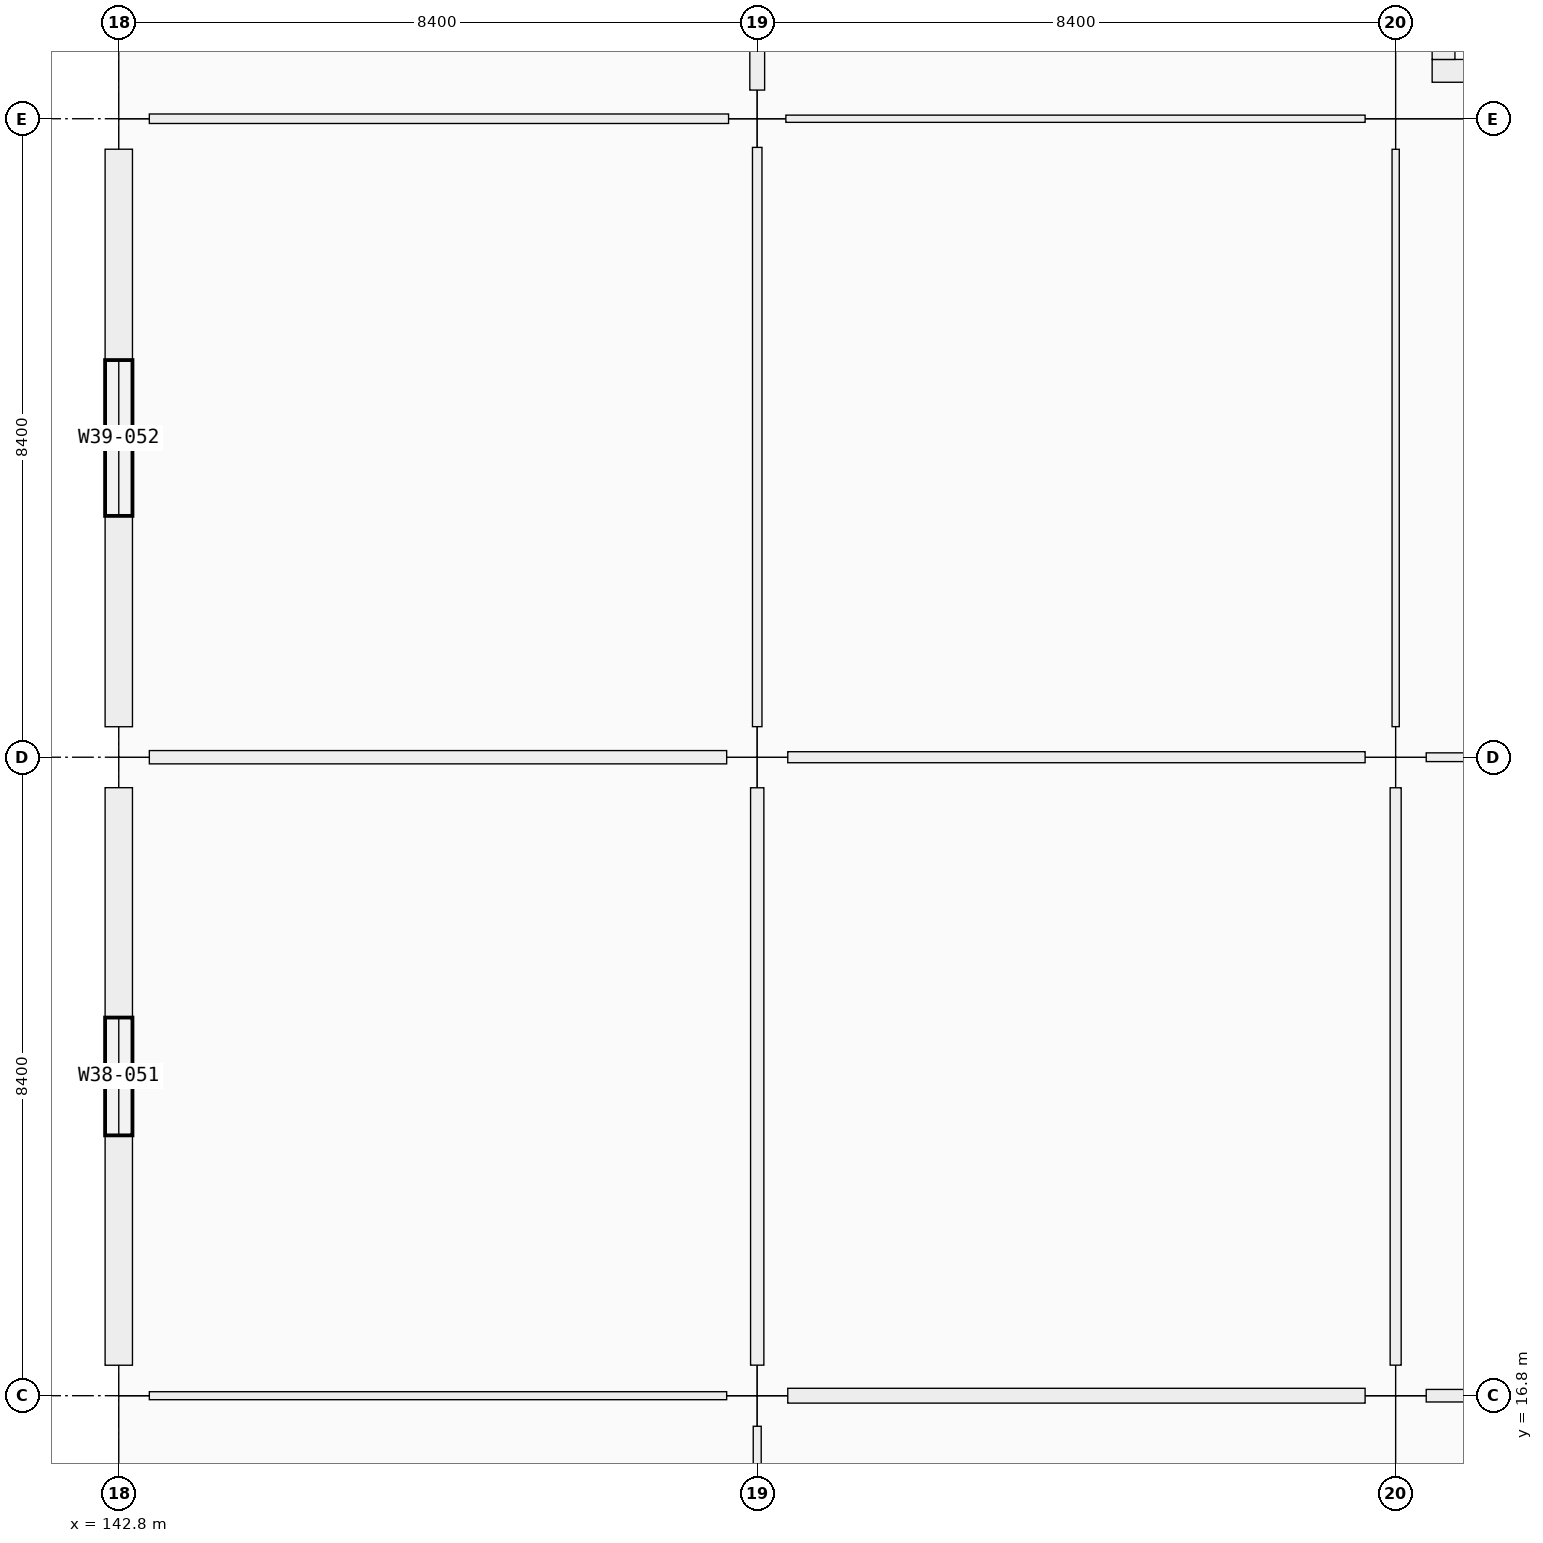
"""IFC4 building model, lengths in metres.
Left out: names, types, materials, properties, quantities, classifications, styles, units other than length and angle.
Written with IfcOpenShell. Run it as: python <this file> out.ifc"""

import sys

from ifc_helpers import new_model, si_unit, direction, frame, frame_2d, origin, origin_2d, place, context, subcontext, project, spatial, rectangle, extrude, element, fill, save


model = new_model("IFC4")
c1 = context("Model", 3, precision=1e-05, world=origin(), true_north=direction((0.0, 1.0)))
c2 = subcontext(c1, "Body", "Model", "MODEL_VIEW")
j1 = project(units=[si_unit("LENGTHUNIT", "METRE"), si_unit("PLANEANGLEUNIT", "RADIAN")], contexts=[c1])
p1 = place(None, origin())
s1 = spatial("IfcSite", under=j1, at=p1, CompositionType="ELEMENT")
p2 = place(p1, origin())
s2 = spatial("IfcBuilding", under=s1, at=p2, CompositionType="ELEMENT")
p3 = place(p2, origin())
s3 = spatial("IfcBuildingStorey", under=s2, at=p3, CompositionType="ELEMENT", Elevation=0.0)
for number, where, z_axis, x_axis in (
    (1, (142.8, 16.8, 0.0), (0.0, 0.0, 1.0), (1.0, 0.0, 0.0)),
    (2, (142.8, 25.2, 0.0), (0.0, 0.0, 1.0), (1.0, 0.0, 0.0)),
    (3, (142.8, 33.6, 0.0), (0.0, 0.0, 1.0), (1.0, 0.0, 0.0)),
    (4, (151.2, 16.8, 0.0), (0.0, 0.0, 1.0), (1.0, 0.0, 0.0)),
    (5, (151.2, 25.2, 0.0), (0.0, 0.0, 1.0), (1.0, 0.0, 0.0)),
):
    element("IfcColumn", number, at=place(p3, frame(where, z_axis=z_axis, x_axis=x_axis)), inside=s3, PredefinedType="COLUMN", context=c2, shape_type="SweptSolid", body=[
        extrude(rectangle(XDim=0.8, YDim=0.8, at=origin_2d()), origin(), (0.0, 0.0, 1.0), 5.76),
    ])
p4 = place(p3, frame((151.2, 33.6, 0.0), z_axis=(0.0, 0.0, 1.0), x_axis=(1.0, 0.0, 0.0)))
e6 = element("IfcColumn", 6, at=p4, inside=s3, PredefinedType="COLUMN", context=c2, shape_type="SweptSolid", body=[
    extrude(rectangle(XDim=0.75, YDim=0.75, at=origin_2d()), origin(), (0.0, 0.0, 1.0), 5.51),
])
for number, where, z_axis, x_axis in (
    (7, (159.6, 16.8, 0.0), (0.0, 0.0, 1.0), (1.0, 0.0, 0.0)),
    (8, (159.6, 25.2, 0.0), (0.0, 0.0, 1.0), (1.0, 0.0, 0.0)),
    (9, (159.6, 33.6, 0.0), (0.0, 0.0, 1.0), (1.0, 0.0, 0.0)),
):
    element("IfcColumn", number, at=place(p3, frame(where, z_axis=z_axis, x_axis=x_axis)), inside=s3, PredefinedType="COLUMN", context=c2, shape_type="SweptSolid", body=[
        extrude(rectangle(XDim=0.8, YDim=0.8, at=origin_2d()), origin(), (0.0, 0.0, 1.0), 5.76),
    ])
p5 = place(p3, frame((142.8, 17.201, 0.0), z_axis=(0.0, 0.0, 1.0), x_axis=(0.0, 1.0, 0.0)))
e10 = element("IfcWall", 10, at=p5, inside=s3, PredefinedType="SOLIDWALL", context=c2, shape_type="SweptSolid", body=[
    extrude(rectangle(XDim=7.598, YDim=0.36, at=frame_2d((3.799, 0.0))), origin(), (0.0, 0.0, 1.0), 4.7),
])
p6 = place(p5, frame((3.024, 0.0, 0.9)))
e11 = element("IfcOpeningElement", 11, at=p6, cuts=e10, PredefinedType="OPENING", context=c2, shape_type="SweptSolid", body=[
    extrude(rectangle(XDim=1.55, YDim=1.6, at=frame_2d((0.775, 0.8))), frame((0.0, 0.18, 0.0), z_axis=(0.0, -1.0, 0.0), x_axis=(1.0, 0.0, 0.0)), (0.0, 0.0, 1.0), 0.36),
])
p7 = place(p3, frame((142.8, 25.601, 0.0), z_axis=(0.0, 0.0, 1.0), x_axis=(0.0, 1.0, 0.0)))
e12 = element("IfcWall", 12, at=p7, inside=s3, PredefinedType="SOLIDWALL", context=c2, shape_type="SweptSolid", body=[
    extrude(rectangle(XDim=7.598, YDim=0.36, at=frame_2d((3.799, 0.0))), origin(), (0.0, 0.0, 1.0), 4.7),
])
p8 = place(p7, frame((2.774, 0.0, 0.9)))
e13 = element("IfcOpeningElement", 13, at=p8, cuts=e12, PredefinedType="OPENING", context=c2, shape_type="SweptSolid", body=[
    extrude(rectangle(XDim=2.05, YDim=1.45, at=frame_2d((1.025, 0.725))), frame((0.0, 0.18, 0.0), z_axis=(0.0, -1.0, 0.0), x_axis=(1.0, 0.0, 0.0)), (0.0, 0.0, 1.0), 0.36),
])
p9 = place(p3, frame((167.52, 34.23, 0.0), z_axis=(0.0, 0.0, 1.0), x_axis=(-1.0, 0.0, 0.0)))
e14 = element("IfcWall", 14, at=p9, inside=s3, PredefinedType="SHEAR", context=c2, shape_type="SweptSolid", body=[
    extrude(rectangle(XDim=7.44, YDim=0.3, at=frame_2d((3.72, 0.0))), origin(), (0.0, 0.0, 1.0), 5.76),
])
p10 = place(p9, frame((1.28, 0.0, 0.0)))
e15 = element("IfcOpeningElement", 15, at=p10, cuts=e14, PredefinedType="OPENING", context=c2, shape_type="SweptSolid", body=[
    extrude(rectangle(XDim=1.5, YDim=2.15, at=frame_2d((0.75, 1.075))), frame((0.0, 0.15, 0.0), z_axis=(0.0, -1.0, 0.0), x_axis=(1.0, 0.0, 0.0)), (0.0, 0.0, 1.0), 0.3),
])
p11 = place(p3, frame((160.23, 34.38, 0.0), z_axis=(0.0, 0.0, 1.0), x_axis=(0.0, 1.0, 0.0)))
e16 = element("IfcWall", 16, at=p11, inside=s3, PredefinedType="SHEAR", context=c2, shape_type="SweptSolid", body=[
    extrude(rectangle(XDim=6.84, YDim=0.3, at=frame_2d((3.42, 0.0))), origin(), (0.0, 0.0, 1.0), 5.76),
])
p12 = place(p3, frame((143.202, 16.8, 0.0), z_axis=(0.0, 0.0, 1.0), x_axis=(1.0, 0.0, 0.0)))
e17 = element("IfcWall", 17, at=p12, inside=s3, PredefinedType="PARTITIONING", context=c2, shape_type="SweptSolid", body=[
    extrude(rectangle(XDim=7.596, YDim=0.105, at=frame_2d((3.798, 0.0))), origin(), (0.0, 0.0, 1.0), 3.66),
])
p13 = place(p12, frame((3.313, 0.0, 0.0)))
e18 = element("IfcOpeningElement", 18, at=p13, cuts=e17, PredefinedType="OPENING", context=c2, shape_type="SweptSolid", body=[
    extrude(rectangle(XDim=0.97, YDim=2.12, at=frame_2d((0.485, 1.06))), frame((0.0, 0.052, 0.0), z_axis=(0.0, -1.0, 0.0), x_axis=(1.0, 0.0, 0.0)), (0.0, 0.0, 1.0), 0.105),
])
p14 = place(p3, frame((143.202, 25.2, 0.0), z_axis=(0.0, 0.0, 1.0), x_axis=(1.0, 0.0, 0.0)))
e19 = element("IfcWall", 19, at=p14, inside=s3, PredefinedType="PARTITIONING", context=c2, shape_type="SweptSolid", body=[
    extrude(rectangle(XDim=7.596, YDim=0.175, at=frame_2d((3.798, 0.0))), origin(), (0.0, 0.0, 1.0), 3.66),
])
p15 = place(p14, frame((3.333, 0.0, 0.0)))
e20 = element("IfcOpeningElement", 20, at=p15, cuts=e19, PredefinedType="OPENING", context=c2, shape_type="SweptSolid", body=[
    extrude(rectangle(XDim=0.93, YDim=2.12, at=frame_2d((0.465, 1.06))), frame((0.0, 0.087, 0.0), z_axis=(0.0, -1.0, 0.0), x_axis=(1.0, 0.0, 0.0)), (0.0, 0.0, 1.0), 0.175),
])
p16 = place(p3, frame((143.202, 33.6, 0.0), z_axis=(0.0, 0.0, 1.0), x_axis=(1.0, 0.0, 0.0)))
e21 = element("IfcWall", 21, at=p16, inside=s3, PredefinedType="PARTITIONING", context=c2, shape_type="SweptSolid", body=[
    extrude(rectangle(XDim=7.621, YDim=0.125, at=frame_2d((3.811, 0.0))), origin(), (0.0, 0.0, 1.0), 3.66),
])
p17 = place(p16, frame((3.271, 0.0, 0.0)))
e22 = element("IfcOpeningElement", 22, at=p17, cuts=e21, PredefinedType="OPENING", context=c2, shape_type="SweptSolid", body=[
    extrude(rectangle(XDim=1.08, YDim=2.25, at=frame_2d((0.54, 1.125))), frame((0.0, 0.062, 0.0), z_axis=(0.0, -1.0, 0.0), x_axis=(1.0, 0.0, 0.0)), (0.0, 0.0, 1.0), 0.125),
])
p18 = place(p3, frame((151.602, 16.8, 0.0), z_axis=(0.0, 0.0, 1.0), x_axis=(1.0, 0.0, 0.0)))
e23 = element("IfcWall", 23, at=p18, inside=s3, PredefinedType="PARTITIONING", context=c2, shape_type="SweptSolid", body=[
    extrude(rectangle(XDim=7.596, YDim=0.195, at=frame_2d((3.798, 0.0))), origin(), (0.0, 0.0, 1.0), 3.66),
])
p19 = place(p18, frame((3.288, 0.0, 0.0)))
e24 = element("IfcOpeningElement", 24, at=p19, cuts=e23, PredefinedType="OPENING", context=c2, shape_type="SweptSolid", body=[
    extrude(rectangle(XDim=1.02, YDim=2.2, at=frame_2d((0.51, 1.1))), frame((0.0, 0.098, 0.0), z_axis=(0.0, -1.0, 0.0), x_axis=(1.0, 0.0, 0.0)), (0.0, 0.0, 1.0), 0.195),
])
p20 = place(p3, frame((151.602, 25.2, 0.0), z_axis=(0.0, 0.0, 1.0), x_axis=(1.0, 0.0, 0.0)))
e25 = element("IfcWall", 25, at=p20, inside=s3, PredefinedType="PARTITIONING", context=c2, shape_type="SweptSolid", body=[
    extrude(rectangle(XDim=7.596, YDim=0.145, at=frame_2d((3.798, 0.0))), origin(), (0.0, 0.0, 1.0), 3.66),
])
p21 = place(p20, frame((3.278, 0.0, 0.0)))
e26 = element("IfcOpeningElement", 26, at=p21, cuts=e25, PredefinedType="OPENING", context=c2, shape_type="SweptSolid", body=[
    extrude(rectangle(XDim=1.04, YDim=2.2, at=frame_2d((0.52, 1.1))), frame((0.0, 0.073, 0.0), z_axis=(0.0, -1.0, 0.0), x_axis=(1.0, 0.0, 0.0)), (0.0, 0.0, 1.0), 0.145),
])
p22 = place(p3, frame((151.577, 33.6, 0.0), z_axis=(0.0, 0.0, 1.0), x_axis=(1.0, 0.0, 0.0)))
e27 = element("IfcWall", 27, at=p22, inside=s3, PredefinedType="PARTITIONING", context=c2, shape_type="SweptSolid", body=[
    extrude(rectangle(XDim=7.621, YDim=0.095, at=frame_2d((3.811, 0.0))), origin(), (0.0, 0.0, 1.0), 3.66),
])
p23 = place(p22, frame((3.311, 0.0, 0.0)))
e28 = element("IfcOpeningElement", 28, at=p23, cuts=e27, PredefinedType="OPENING", context=c2, shape_type="SweptSolid", body=[
    extrude(rectangle(XDim=1.0, YDim=2.2, at=frame_2d((0.5, 1.1))), frame((0.0, 0.047, 0.0), z_axis=(0.0, -1.0, 0.0), x_axis=(1.0, 0.0, 0.0)), (0.0, 0.0, 1.0), 0.095),
])
p24 = place(p3, frame((160.002, 16.8, 0.0), z_axis=(0.0, 0.0, 1.0), x_axis=(1.0, 0.0, 0.0)))
e29 = element("IfcWall", 29, at=p24, inside=s3, PredefinedType="PARTITIONING", context=c2, shape_type="SweptSolid", body=[
    extrude(rectangle(XDim=7.596, YDim=0.165, at=frame_2d((3.798, 0.0))), origin(), (0.0, 0.0, 1.0), 3.66),
])
p25 = place(p24, frame((3.338, 0.0, 0.0)))
e30 = element("IfcOpeningElement", 30, at=p25, cuts=e29, PredefinedType="OPENING", context=c2, shape_type="SweptSolid", body=[
    extrude(rectangle(XDim=0.92, YDim=2.15, at=frame_2d((0.46, 1.075))), frame((0.0, 0.083, 0.0), z_axis=(0.0, -1.0, 0.0), x_axis=(1.0, 0.0, 0.0)), (0.0, 0.0, 1.0), 0.165),
])
p26 = place(p3, frame((160.002, 25.2, 0.0), z_axis=(0.0, 0.0, 1.0), x_axis=(1.0, 0.0, 0.0)))
e31 = element("IfcWall", 31, at=p26, inside=s3, PredefinedType="PARTITIONING", context=c2, shape_type="SweptSolid", body=[
    extrude(rectangle(XDim=7.596, YDim=0.115, at=frame_2d((3.798, 0.0))), origin(), (0.0, 0.0, 1.0), 3.66),
])
p27 = place(p26, frame((3.268, 0.0, 0.0)))
e32 = element("IfcOpeningElement", 32, at=p27, cuts=e31, PredefinedType="OPENING", context=c2, shape_type="SweptSolid", body=[
    extrude(rectangle(XDim=1.06, YDim=2.25, at=frame_2d((0.53, 1.125))), frame((0.0, 0.058, 0.0), z_axis=(0.0, -1.0, 0.0), x_axis=(1.0, 0.0, 0.0)), (0.0, 0.0, 1.0), 0.115),
])
p28 = place(p3, frame((151.2, 8.752, 0.0), z_axis=(0.0, 0.0, 1.0), x_axis=(0.0, 1.0, 0.0)))
e33 = element("IfcWall", 33, at=p28, inside=s3, PredefinedType="PARTITIONING", context=c2, shape_type="SweptSolid", body=[
    extrude(rectangle(XDim=7.646, YDim=0.105, at=frame_2d((3.823, 0.0))), origin(), (0.0, 0.0, 1.0), 3.66),
])
p29 = place(p28, frame((3.358, 0.0, 0.0)))
e34 = element("IfcOpeningElement", 34, at=p29, cuts=e33, PredefinedType="OPENING", context=c2, shape_type="SweptSolid", body=[
    extrude(rectangle(XDim=0.93, YDim=2.12, at=frame_2d((0.465, 1.06))), frame((0.0, 0.052, 0.0), z_axis=(0.0, -1.0, 0.0), x_axis=(1.0, 0.0, 0.0)), (0.0, 0.0, 1.0), 0.105),
])
p30 = place(p3, frame((151.2, 17.202, 0.0), z_axis=(0.0, 0.0, 1.0), x_axis=(0.0, 1.0, 0.0)))
e35 = element("IfcWall", 35, at=p30, inside=s3, PredefinedType="PARTITIONING", context=c2, shape_type="SweptSolid", body=[
    extrude(rectangle(XDim=7.596, YDim=0.175, at=frame_2d((3.798, 0.0))), origin(), (0.0, 0.0, 1.0), 3.66),
])
p31 = place(p30, frame((3.278, 0.0, 0.0)))
e36 = element("IfcOpeningElement", 36, at=p31, cuts=e35, PredefinedType="OPENING", context=c2, shape_type="SweptSolid", body=[
    extrude(rectangle(XDim=1.04, YDim=2.2, at=frame_2d((0.52, 1.1))), frame((0.0, 0.087, 0.0), z_axis=(0.0, -1.0, 0.0), x_axis=(1.0, 0.0, 0.0)), (0.0, 0.0, 1.0), 0.175),
])
p32 = place(p3, frame((151.2, 25.602, 0.0), z_axis=(0.0, 0.0, 1.0), x_axis=(0.0, 1.0, 0.0)))
e37 = element("IfcWall", 37, at=p32, inside=s3, PredefinedType="PARTITIONING", context=c2, shape_type="SweptSolid", body=[
    extrude(rectangle(XDim=7.621, YDim=0.125, at=frame_2d((3.811, 0.0))), origin(), (0.0, 0.0, 1.0), 3.66),
])
p33 = place(p32, frame((3.301, 0.0, 0.0)))
e38 = element("IfcOpeningElement", 38, at=p33, cuts=e37, PredefinedType="OPENING", context=c2, shape_type="SweptSolid", body=[
    extrude(rectangle(XDim=1.02, YDim=2.2, at=frame_2d((0.51, 1.1))), frame((0.0, 0.062, 0.0), z_axis=(0.0, -1.0, 0.0), x_axis=(1.0, 0.0, 0.0)), (0.0, 0.0, 1.0), 0.125),
])
p34 = place(p3, frame((151.2, 33.977, 0.0), z_axis=(0.0, 0.0, 1.0), x_axis=(0.0, 1.0, 0.0)))
e39 = element("IfcWall", 39, at=p34, inside=s3, PredefinedType="PARTITIONING", context=c2, shape_type="SweptSolid", body=[
    extrude(rectangle(XDim=7.671, YDim=0.195, at=frame_2d((3.835, 0.0))), origin(), (0.0, 0.0, 1.0), 3.66),
])
p35 = place(p34, frame((3.336, 0.0, 0.0)))
e40 = element("IfcOpeningElement", 40, at=p35, cuts=e39, PredefinedType="OPENING", context=c2, shape_type="SweptSolid", body=[
    extrude(rectangle(XDim=1.0, YDim=2.2, at=frame_2d((0.5, 1.1))), frame((0.0, 0.098, 0.0), z_axis=(0.0, -1.0, 0.0), x_axis=(1.0, 0.0, 0.0)), (0.0, 0.0, 1.0), 0.195),
])
p36 = place(p3, frame((159.6, 17.202, 0.0), z_axis=(0.0, 0.0, 1.0), x_axis=(0.0, 1.0, 0.0)))
e41 = element("IfcWall", 41, at=p36, inside=s3, PredefinedType="PARTITIONING", context=c2, shape_type="SweptSolid", body=[
    extrude(rectangle(XDim=7.596, YDim=0.145, at=frame_2d((3.798, 0.0))), origin(), (0.0, 0.0, 1.0), 3.66),
])
p37 = place(p36, frame((3.273, 0.0, 0.0)))
e42 = element("IfcOpeningElement", 42, at=p37, cuts=e41, PredefinedType="OPENING", context=c2, shape_type="SweptSolid", body=[
    extrude(rectangle(XDim=1.05, YDim=2.12, at=frame_2d((0.525, 1.06))), frame((0.0, 0.073, 0.0), z_axis=(0.0, -1.0, 0.0), x_axis=(1.0, 0.0, 0.0)), (0.0, 0.0, 1.0), 0.145),
])
p38 = place(p3, frame((159.6, 25.602, 0.0), z_axis=(0.0, 0.0, 1.0), x_axis=(0.0, 1.0, 0.0)))
e43 = element("IfcWall", 43, at=p38, inside=s3, PredefinedType="PARTITIONING", context=c2, shape_type="SweptSolid", body=[
    extrude(rectangle(XDim=7.596, YDim=0.095, at=frame_2d((3.798, 0.0))), origin(), (0.0, 0.0, 1.0), 3.66),
])
p39 = place(p38, frame((3.328, 0.0, 0.0)))
e44 = element("IfcOpeningElement", 44, at=p39, cuts=e43, PredefinedType="OPENING", context=c2, shape_type="SweptSolid", body=[
    extrude(rectangle(XDim=0.94, YDim=2.15, at=frame_2d((0.47, 1.075))), frame((0.0, 0.047, 0.0), z_axis=(0.0, -1.0, 0.0), x_axis=(1.0, 0.0, 0.0)), (0.0, 0.0, 1.0), 0.095),
])
p40 = place(p6, origin())
e45 = element("IfcWindow", 45, at=p40, inside=s3, PartitioningType="SINGLE_PANEL", PredefinedType="WINDOW", context=c2, shape_type="SweptSolid", body=[
    extrude(rectangle(XDim=1.55, YDim=1.6, at=frame_2d((0.775, 0.8))), frame((0.0, 0.03, 0.0), z_axis=(0.0, -1.0, 0.0), x_axis=(1.0, 0.0, 0.0)), (0.0, 0.0, 1.0), 0.06),
])
fill(e11, e45)
p41 = place(p8, origin())
e46 = element("IfcWindow", 46, at=p41, inside=s3, PartitioningType="SINGLE_PANEL", PredefinedType="WINDOW", context=c2, shape_type="SweptSolid", body=[
    extrude(rectangle(XDim=2.05, YDim=1.45, at=frame_2d((1.025, 0.725))), frame((0.0, 0.03, 0.0), z_axis=(0.0, -1.0, 0.0), x_axis=(1.0, 0.0, 0.0)), (0.0, 0.0, 1.0), 0.06),
])
fill(e13, e46)
p42 = place(p39, origin())
e47 = element("IfcDoor", 47, at=p42, inside=s3, OperationType="SINGLE_SWING_RIGHT", PredefinedType="DOOR", context=c2, shape_type="SweptSolid", body=[
    extrude(rectangle(XDim=0.94, YDim=2.15, at=frame_2d((0.47, 1.075))), frame((0.0, 0.025, 0.0), z_axis=(0.0, -1.0, 0.0), x_axis=(1.0, 0.0, 0.0)), (0.0, 0.0, 1.0), 0.05),
])
fill(e44, e47)
p43 = place(p13, origin())
e48 = element("IfcDoor", 48, at=p43, inside=s3, OperationType="SINGLE_SWING_LEFT", PredefinedType="DOOR", context=c2, shape_type="SweptSolid", body=[
    extrude(rectangle(XDim=0.97, YDim=2.12, at=frame_2d((0.485, 1.06))), frame((0.0, 0.025, 0.0), z_axis=(0.0, -1.0, 0.0), x_axis=(1.0, 0.0, 0.0)), (0.0, 0.0, 1.0), 0.05),
])
fill(e18, e48)
p44 = place(p15, origin())
e49 = element("IfcDoor", 49, at=p44, inside=s3, OperationType="SINGLE_SWING_RIGHT", PredefinedType="DOOR", context=c2, shape_type="SweptSolid", body=[
    extrude(rectangle(XDim=0.93, YDim=2.12, at=frame_2d((0.465, 1.06))), frame((0.0, 0.025, 0.0), z_axis=(0.0, -1.0, 0.0), x_axis=(1.0, 0.0, 0.0)), (0.0, 0.0, 1.0), 0.05),
])
fill(e20, e49)
p45 = place(p17, origin())
e50 = element("IfcDoor", 50, at=p45, inside=s3, OperationType="SINGLE_SWING_LEFT", PredefinedType="DOOR", context=c2, shape_type="SweptSolid", body=[
    extrude(rectangle(XDim=1.08, YDim=2.25, at=frame_2d((0.54, 1.125))), frame((0.0, 0.025, 0.0), z_axis=(0.0, -1.0, 0.0), x_axis=(1.0, 0.0, 0.0)), (0.0, 0.0, 1.0), 0.05),
])
fill(e22, e50)
p46 = place(p19, origin())
e51 = element("IfcDoor", 51, at=p46, inside=s3, OperationType="SINGLE_SWING_RIGHT", PredefinedType="DOOR", context=c2, shape_type="SweptSolid", body=[
    extrude(rectangle(XDim=1.02, YDim=2.2, at=frame_2d((0.51, 1.1))), frame((0.0, 0.025, 0.0), z_axis=(0.0, -1.0, 0.0), x_axis=(1.0, 0.0, 0.0)), (0.0, 0.0, 1.0), 0.05),
])
fill(e24, e51)
p47 = place(p23, origin())
e52 = element("IfcDoor", 52, at=p47, inside=s3, OperationType="SINGLE_SWING_LEFT", PredefinedType="DOOR", context=c2, shape_type="SweptSolid", body=[
    extrude(rectangle(XDim=1.0, YDim=2.2, at=frame_2d((0.5, 1.1))), frame((0.0, 0.025, 0.0), z_axis=(0.0, -1.0, 0.0), x_axis=(1.0, 0.0, 0.0)), (0.0, 0.0, 1.0), 0.05),
])
fill(e28, e52)
p48 = place(p21, origin())
e53 = element("IfcDoor", 53, at=p48, inside=s3, OperationType="SINGLE_SWING_LEFT", PredefinedType="DOOR", context=c2, shape_type="SweptSolid", body=[
    extrude(rectangle(XDim=1.04, YDim=2.2, at=frame_2d((0.52, 1.1))), frame((0.0, 0.025, 0.0), z_axis=(0.0, -1.0, 0.0), x_axis=(1.0, 0.0, 0.0)), (0.0, 0.0, 1.0), 0.05),
])
fill(e26, e53)
p49 = place(p31, origin())
e54 = element("IfcDoor", 54, at=p49, inside=s3, OperationType="SINGLE_SWING_RIGHT", PredefinedType="DOOR", context=c2, shape_type="SweptSolid", body=[
    extrude(rectangle(XDim=1.04, YDim=2.2, at=frame_2d((0.52, 1.1))), frame((0.0, 0.025, 0.0), z_axis=(0.0, -1.0, 0.0), x_axis=(1.0, 0.0, 0.0)), (0.0, 0.0, 1.0), 0.05),
])
fill(e36, e54)
p50 = place(p33, origin())
e55 = element("IfcDoor", 55, at=p50, inside=s3, OperationType="SINGLE_SWING_LEFT", PredefinedType="DOOR", context=c2, shape_type="SweptSolid", body=[
    extrude(rectangle(XDim=1.02, YDim=2.2, at=frame_2d((0.51, 1.1))), frame((0.0, 0.025, 0.0), z_axis=(0.0, -1.0, 0.0), x_axis=(1.0, 0.0, 0.0)), (0.0, 0.0, 1.0), 0.05),
])
fill(e38, e55)
p51 = place(p37, origin())
e56 = element("IfcDoor", 56, at=p51, inside=s3, OperationType="SINGLE_SWING_LEFT", PredefinedType="DOOR", context=c2, shape_type="SweptSolid", body=[
    extrude(rectangle(XDim=1.05, YDim=2.12, at=frame_2d((0.525, 1.06))), frame((0.0, 0.025, 0.0), z_axis=(0.0, -1.0, 0.0), x_axis=(1.0, 0.0, 0.0)), (0.0, 0.0, 1.0), 0.05),
])
fill(e42, e56)
save(model, sys.argv[1])
